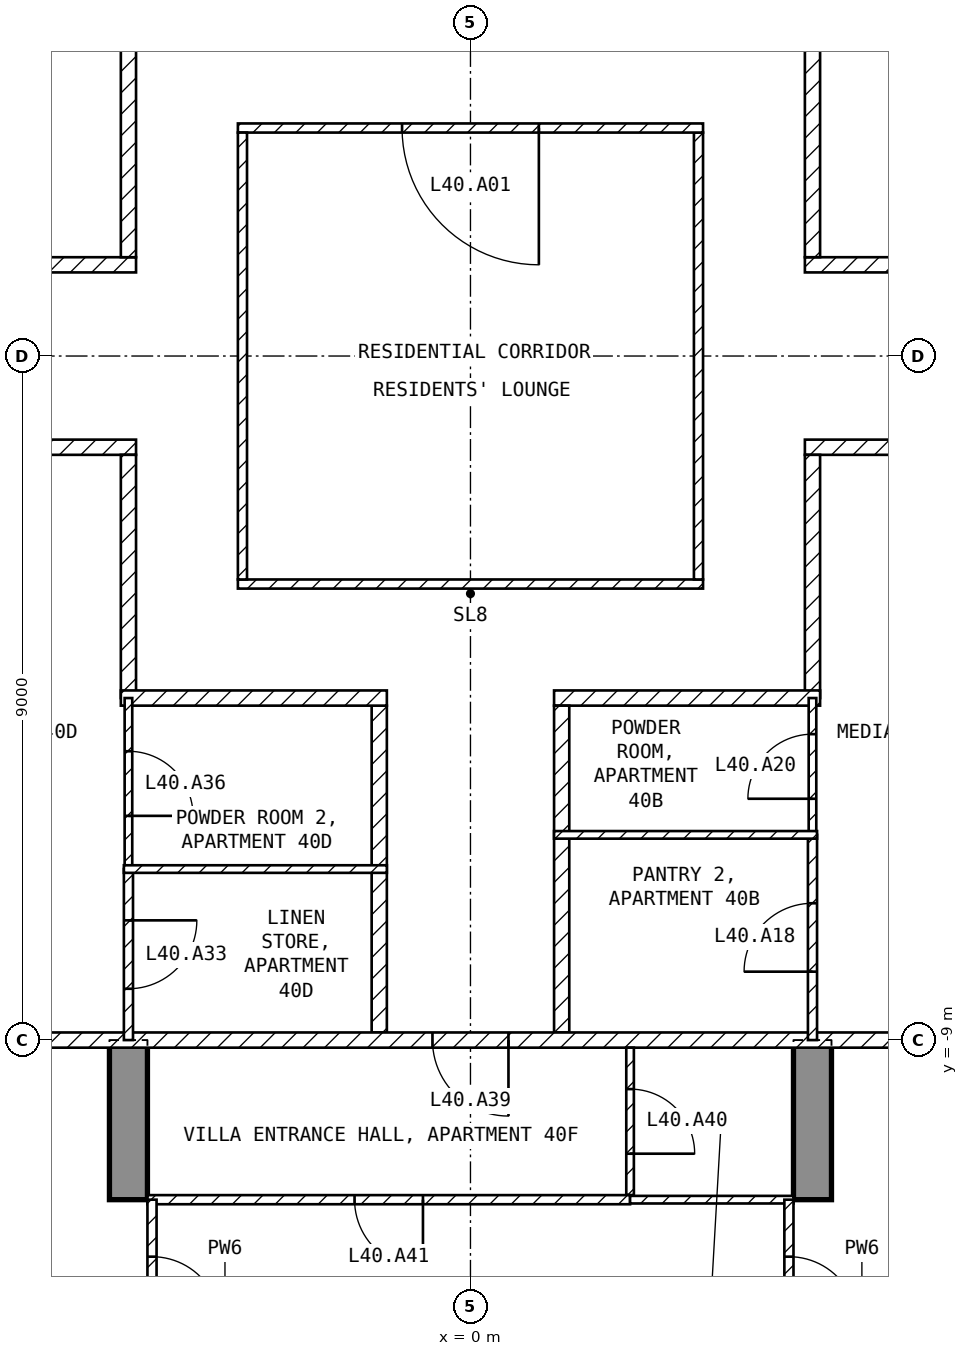
"""IFC4 building model, lengths in metres.
Left out: names, types, materials, properties, quantities, classifications, styles, units other than length and angle.
Written with IfcOpenShell. Run it as: python <this file> out.ifc"""

import sys

from ifc_helpers import new_model, si_unit, direction, frame, frame_2d, origin, place, context, subcontext, project, spatial, polyline, rectangle, outline, extrude, element, fill, save


model = new_model("IFC4")
c1 = context("Model", 3, precision=1e-05, world=origin(), true_north=direction((0.0, 1.0)))
c2 = subcontext(c1, "Body", "Model", "MODEL_VIEW")
j1 = project(units=[si_unit("LENGTHUNIT", "METRE"), si_unit("PLANEANGLEUNIT", "RADIAN")], contexts=[c1])
p1 = place(None, origin())
s1 = spatial("IfcSite", under=j1, at=p1, CompositionType="ELEMENT")
p2 = place(p1, origin())
s2 = spatial("IfcBuilding", under=s1, at=p2, CompositionType="ELEMENT")
p3 = place(p2, frame((0.0, 0.0, 166.6)))
s3 = spatial("IfcBuildingStorey", under=s2, at=p3, CompositionType="ELEMENT", Elevation=166.6)
for number, where, z_axis, x_axis in (
    (1, (-4.75, -20.225, -0.25), (1.0, 0.0, 0.0), (0.0, 1.0, 0.0)),
    (2, (4.25, -20.225, -0.25), (1.0, 0.0, 0.0), (0.0, 1.0, 0.0)),
):
    element("IfcWall", number, at=place(p3, frame(where, z_axis=z_axis, x_axis=x_axis)), inside=s3, PredefinedType="SHEAR", context=c2, shape_type="SweptSolid", body=[
        extrude(outline(polyline([(0.0, 0.0), (6.725, 0.0), (6.725, 2.65), (9.125, 2.65), (9.125, 0.0), (11.225, 0.0), (11.225, 3.5), (0.0, 3.5), (0.0, 0.0)])), origin(), (0.0, 0.0, 1.0), 0.5),
    ])
p4 = place(p3, frame((-3.06, -3.0, 0.0), z_axis=(0.0, 0.0, 1.0), x_axis=(1.0, 0.0, 0.0)))
e3 = element("IfcWall", 3, at=p4, inside=s3, PredefinedType="PARTITIONING", context=c2, shape_type="SweptSolid", body=[
    extrude(rectangle(XDim=6.12, YDim=0.12, at=frame_2d((3.06, 0.0))), origin(), (0.0, 0.0, 1.0), 3.25),
])
p5 = place(p3, frame((3.0, -2.94, 0.0), z_axis=(0.0, 0.0, 1.0), x_axis=(0.0, 1.0, 0.0)))
e4 = element("IfcWall", 4, at=p5, inside=s3, PredefinedType="PARTITIONING", context=c2, shape_type="SweptSolid", body=[
    extrude(rectangle(XDim=5.88, YDim=0.12, at=frame_2d((2.94, 0.0))), origin(), (0.0, 0.0, 1.0), 3.25),
])
p6 = place(p3, frame((3.06, 3.0, 0.0), z_axis=(0.0, 0.0, 1.0), x_axis=(-1.0, 0.0, 0.0)))
e5 = element("IfcWall", 5, at=p6, inside=s3, PredefinedType="PARTITIONING", context=c2, shape_type="SweptSolid", body=[
    extrude(rectangle(XDim=6.12, YDim=0.12, at=frame_2d((3.06, 0.0))), origin(), (0.0, 0.0, 1.0), 3.25),
])
p7 = place(p6, frame((2.16, 0.0, 0.0)))
e6 = element("IfcOpeningElement", 6, at=p7, cuts=e5, PredefinedType="OPENING", context=c2, shape_type="SweptSolid", body=[
    extrude(rectangle(XDim=1.8, YDim=2.1, at=frame_2d((0.9, 1.05))), frame((0.0, 0.07, 0.0), z_axis=(0.0, -1.0, 0.0), x_axis=(1.0, 0.0, 0.0)), (0.0, 0.0, 1.0), 0.14),
])
p8 = place(p3, frame((-3.0, 2.94, 0.0), z_axis=(0.0, 0.0, 1.0), x_axis=(0.0, -1.0, 0.0)))
e7 = element("IfcWall", 7, at=p8, inside=s3, PredefinedType="PARTITIONING", context=c2, shape_type="SweptSolid", body=[
    extrude(rectangle(XDim=5.88, YDim=0.12, at=frame_2d((2.94, 0.0))), origin(), (0.0, 0.0, 1.0), 3.25),
])
p9 = place(p3, frame((4.4, 1.2, 0.0), z_axis=(0.0, 0.0, 1.0), x_axis=(1.0, 0.0, 0.0)))
e8 = element("IfcWall", 8, at=p9, inside=s3, PredefinedType="PARTITIONING", context=c2, shape_type="SweptSolid", body=[
    extrude(rectangle(XDim=17.2, YDim=0.2, at=frame_2d((8.6, 0.0))), origin(), (0.0, 0.0, 1.0), 3.25),
])
p10 = place(p9, frame((10.475, 0.0, 0.0)))
e9 = element("IfcOpeningElement", 9, at=p10, cuts=e8, PredefinedType="OPENING", context=c2, shape_type="SweptSolid", body=[
    extrude(rectangle(XDim=1.0, YDim=2.1, at=frame_2d((0.5, 1.05))), frame((0.0, 0.11, 0.0), z_axis=(0.0, -1.0, 0.0), x_axis=(1.0, 0.0, 0.0)), (0.0, 0.0, 1.0), 0.22),
])
p11 = place(p3, frame((4.5, 4.5, 0.0), z_axis=(0.0, 0.0, 1.0), x_axis=(0.0, -1.0, 0.0)))
e10 = element("IfcWall", 10, at=p11, inside=s3, PredefinedType="PARTITIONING", context=c2, shape_type="SweptSolid", body=[
    extrude(rectangle(XDim=3.2, YDim=0.2, at=frame_2d((1.6, 0.0))), origin(), (0.0, 0.0, 1.0), 3.25),
])
p12 = place(p3, frame((21.6, -1.2, 0.0), z_axis=(0.0, 0.0, 1.0), x_axis=(-1.0, 0.0, 0.0)))
e11 = element("IfcWall", 11, at=p12, inside=s3, PredefinedType="PARTITIONING", context=c2, shape_type="SweptSolid", body=[
    extrude(rectangle(XDim=17.2, YDim=0.2, at=frame_2d((8.6, 0.0))), origin(), (0.0, 0.0, 1.0), 3.25),
])
p13 = place(p12, frame((3.625, 0.0, 0.0)))
e12 = element("IfcOpeningElement", 12, at=p13, cuts=e11, PredefinedType="OPENING", context=c2, shape_type="SweptSolid", body=[
    extrude(rectangle(XDim=1.0, YDim=2.1, at=frame_2d((0.5, 1.05))), frame((0.0, 0.11, 0.0), z_axis=(0.0, -1.0, 0.0), x_axis=(1.0, 0.0, 0.0)), (0.0, 0.0, 1.0), 0.22),
])
p14 = place(p3, frame((4.5, -1.3, 0.0), z_axis=(0.0, 0.0, 1.0), x_axis=(0.0, -1.0, 0.0)))
e13 = element("IfcWall", 13, at=p14, inside=s3, PredefinedType="PARTITIONING", context=c2, shape_type="SweptSolid", body=[
    extrude(rectangle(XDim=3.2, YDim=0.2, at=frame_2d((1.6, 0.0))), origin(), (0.0, 0.0, 1.0), 3.25),
])
p15 = place(p3, frame((4.6, -4.5, 0.0), z_axis=(0.0, 0.0, 1.0), x_axis=(-1.0, 0.0, 0.0)))
e14 = element("IfcWall", 14, at=p15, inside=s3, PredefinedType="PARTITIONING", context=c2, shape_type="SweptSolid", body=[
    extrude(rectangle(XDim=3.5, YDim=0.2, at=frame_2d((1.75, 0.0))), origin(), (0.0, 0.0, 1.0), 3.25),
])
p16 = place(p3, frame((1.2, -4.6, 0.0), z_axis=(0.0, 0.0, 1.0), x_axis=(0.0, -1.0, 0.0)))
e15 = element("IfcWall", 15, at=p16, inside=s3, PredefinedType="PARTITIONING", context=c2, shape_type="SweptSolid", body=[
    extrude(rectangle(XDim=4.3, YDim=0.2, at=frame_2d((2.15, 0.0))), origin(), (0.0, 0.0, 1.0), 3.25),
])
p17 = place(p3, frame((-21.6, 1.2, 0.0), z_axis=(0.0, 0.0, 1.0), x_axis=(1.0, 0.0, 0.0)))
e16 = element("IfcWall", 16, at=p17, inside=s3, PredefinedType="PARTITIONING", context=c2, shape_type="SweptSolid", body=[
    extrude(rectangle(XDim=17.2, YDim=0.2, at=frame_2d((8.6, 0.0))), origin(), (0.0, 0.0, 1.0), 3.25),
])
p18 = place(p17, frame((3.475, 0.0, 0.0)))
e17 = element("IfcOpeningElement", 17, at=p18, cuts=e16, PredefinedType="OPENING", context=c2, shape_type="SweptSolid", body=[
    extrude(rectangle(XDim=1.0, YDim=2.1, at=frame_2d((0.5, 1.05))), frame((0.0, 0.11, 0.0), z_axis=(0.0, -1.0, 0.0), x_axis=(1.0, 0.0, 0.0)), (0.0, 0.0, 1.0), 0.22),
])
p19 = place(p3, frame((-4.5, 1.3, 0.0), z_axis=(0.0, 0.0, 1.0), x_axis=(0.0, 1.0, 0.0)))
e18 = element("IfcWall", 18, at=p19, inside=s3, PredefinedType="PARTITIONING", context=c2, shape_type="SweptSolid", body=[
    extrude(rectangle(XDim=3.2, YDim=0.2, at=frame_2d((1.6, 0.0))), origin(), (0.0, 0.0, 1.0), 3.25),
])
p20 = place(p3, frame((-4.4, -1.2, 0.0), z_axis=(0.0, 0.0, 1.0), x_axis=(-1.0, 0.0, 0.0)))
e19 = element("IfcWall", 19, at=p20, inside=s3, PredefinedType="PARTITIONING", context=c2, shape_type="SweptSolid", body=[
    extrude(rectangle(XDim=17.2, YDim=0.2, at=frame_2d((8.6, 0.0))), origin(), (0.0, 0.0, 1.0), 3.25),
])
p21 = place(p20, frame((9.95, 0.0, 0.0)))
e20 = element("IfcOpeningElement", 20, at=p21, cuts=e19, PredefinedType="OPENING", context=c2, shape_type="SweptSolid", body=[
    extrude(rectangle(XDim=1.0, YDim=2.1, at=frame_2d((0.5, 1.05))), frame((0.0, 0.11, 0.0), z_axis=(0.0, -1.0, 0.0), x_axis=(1.0, 0.0, 0.0)), (0.0, 0.0, 1.0), 0.22),
])
p22 = place(p3, frame((-4.5, -4.5, 0.0), z_axis=(0.0, 0.0, 1.0), x_axis=(0.0, 1.0, 0.0)))
e21 = element("IfcWall", 21, at=p22, inside=s3, PredefinedType="PARTITIONING", context=c2, shape_type="SweptSolid", body=[
    extrude(rectangle(XDim=3.2, YDim=0.2, at=frame_2d((1.6, 0.0))), origin(), (0.0, 0.0, 1.0), 3.25),
])
p23 = place(p3, frame((-1.2, -8.9, 0.0), z_axis=(0.0, 0.0, 1.0), x_axis=(0.0, 1.0, 0.0)))
e22 = element("IfcWall", 22, at=p23, inside=s3, PredefinedType="PARTITIONING", context=c2, shape_type="SweptSolid", body=[
    extrude(rectangle(XDim=4.3, YDim=0.2, at=frame_2d((2.15, 0.0))), origin(), (0.0, 0.0, 1.0), 3.25),
])
p24 = place(p3, frame((-1.1, -4.5, 0.0), z_axis=(0.0, 0.0, 1.0), x_axis=(-1.0, 0.0, 0.0)))
e23 = element("IfcWall", 23, at=p24, inside=s3, PredefinedType="PARTITIONING", context=c2, shape_type="SweptSolid", body=[
    extrude(rectangle(XDim=3.5, YDim=0.2, at=frame_2d((1.75, 0.0))), origin(), (0.0, 0.0, 1.0), 3.25),
])
p25 = place(p3, frame((8.92, -9.0, 0.0), z_axis=(0.0, 0.0, 1.0), x_axis=(-1.0, 0.0, 0.0)))
e24 = element("IfcWall", 24, at=p25, inside=s3, PredefinedType="PARTITIONING", context=c2, shape_type="SweptSolid", body=[
    extrude(rectangle(XDim=17.84, YDim=0.2, at=frame_2d((8.92, 0.0))), origin(), (0.0, 0.0, 1.0), 3.25),
])
p26 = place(p25, frame((8.42, 0.0, 0.0)))
e25 = element("IfcOpeningElement", 25, at=p26, cuts=e24, PredefinedType="OPENING", context=c2, shape_type="SweptSolid", body=[
    extrude(rectangle(XDim=1.0, YDim=2.1, at=frame_2d((0.5, 1.05))), frame((0.0, 0.11, 0.0), z_axis=(0.0, -1.0, 0.0), x_axis=(1.0, 0.0, 0.0)), (0.0, 0.0, 1.0), 0.22),
])
p27 = place(p3, frame((4.5, -6.3, 0.0), z_axis=(0.0, 0.0, 1.0), x_axis=(0.0, 1.0, 0.0)))
e26 = element("IfcWall", 26, at=p27, inside=s3, PredefinedType="PARTITIONING", context=c2, shape_type="SweptSolid", body=[
    extrude(rectangle(XDim=1.8, YDim=0.1, at=frame_2d((0.9, 0.0))), origin(), (0.0, 0.0, 1.0), 3.25),
])
p28 = place(p27, frame((0.475, 0.0, 0.0)))
e27 = element("IfcOpeningElement", 27, at=p28, cuts=e26, PredefinedType="OPENING", context=c2, shape_type="SweptSolid", body=[
    extrude(rectangle(XDim=0.85, YDim=2.1, at=frame_2d((0.425, 1.05))), frame((0.0, 0.06, 0.0), z_axis=(0.0, -1.0, 0.0), x_axis=(1.0, 0.0, 0.0)), (0.0, 0.0, 1.0), 0.12),
])
p29 = place(p3, frame((4.5, -9.0, 0.0), z_axis=(0.0, 0.0, 1.0), x_axis=(0.0, 1.0, 0.0)))
e28 = element("IfcWall", 28, at=p29, inside=s3, PredefinedType="PARTITIONING", context=c2, shape_type="SweptSolid", body=[
    extrude(rectangle(XDim=2.7, YDim=0.12, at=frame_2d((1.35, 0.0))), origin(), (0.0, 0.0, 1.0), 3.25),
])
p30 = place(p29, frame((0.9, 0.0, 0.0)))
e29 = element("IfcOpeningElement", 29, at=p30, cuts=e28, PredefinedType="OPENING", context=c2, shape_type="SweptSolid", body=[
    extrude(rectangle(XDim=0.9, YDim=2.1, at=frame_2d((0.45, 1.05))), frame((0.0, 0.07, 0.0), z_axis=(0.0, -1.0, 0.0), x_axis=(1.0, 0.0, 0.0)), (0.0, 0.0, 1.0), 0.14),
])
p31 = place(p3, frame((4.56, -6.3, 0.0), z_axis=(0.0, 0.0, 1.0), x_axis=(-1.0, 0.0, 0.0)))
e30 = element("IfcWall", 30, at=p31, inside=s3, PredefinedType="PARTITIONING", context=c2, shape_type="SweptSolid", body=[
    extrude(rectangle(XDim=3.46, YDim=0.1, at=frame_2d((1.73, 0.0))), origin(), (0.0, 0.0, 1.0), 3.25),
])
p32 = place(p3, frame((-4.5, -4.5, 0.0), z_axis=(0.0, 0.0, 1.0), x_axis=(0.0, -1.0, 0.0)))
e31 = element("IfcWall", 31, at=p32, inside=s3, PredefinedType="PARTITIONING", context=c2, shape_type="SweptSolid", body=[
    extrude(rectangle(XDim=2.25, YDim=0.1, at=frame_2d((1.125, 0.0))), origin(), (0.0, 0.0, 1.0), 3.25),
])
p33 = place(p32, frame((0.7, 0.0, 0.0)))
e32 = element("IfcOpeningElement", 32, at=p33, cuts=e31, PredefinedType="OPENING", context=c2, shape_type="SweptSolid", body=[
    extrude(rectangle(XDim=0.85, YDim=2.1, at=frame_2d((0.425, 1.05))), frame((0.0, 0.06, 0.0), z_axis=(0.0, -1.0, 0.0), x_axis=(1.0, 0.0, 0.0)), (0.0, 0.0, 1.0), 0.12),
])
p34 = place(p3, frame((-4.5, -6.75, 0.0), z_axis=(0.0, 0.0, 1.0), x_axis=(0.0, -1.0, 0.0)))
e33 = element("IfcWall", 33, at=p34, inside=s3, PredefinedType="PARTITIONING", context=c2, shape_type="SweptSolid", body=[
    extrude(rectangle(XDim=2.25, YDim=0.12, at=frame_2d((1.125, 0.0))), origin(), (0.0, 0.0, 1.0), 3.25),
])
p35 = place(p34, frame((0.675, 0.0, 0.0)))
e34 = element("IfcOpeningElement", 34, at=p35, cuts=e33, PredefinedType="OPENING", context=c2, shape_type="SweptSolid", body=[
    extrude(rectangle(XDim=0.9, YDim=2.1, at=frame_2d((0.45, 1.05))), frame((0.0, 0.07, 0.0), z_axis=(0.0, -1.0, 0.0), x_axis=(1.0, 0.0, 0.0)), (0.0, 0.0, 1.0), 0.14),
])
p36 = place(p3, frame((-1.1, -6.75, 0.0), z_axis=(0.0, 0.0, 1.0), x_axis=(-1.0, 0.0, 0.0)))
e35 = element("IfcWall", 35, at=p36, inside=s3, PredefinedType="PARTITIONING", context=c2, shape_type="SweptSolid", body=[
    extrude(rectangle(XDim=3.46, YDim=0.1, at=frame_2d((1.73, 0.0))), origin(), (0.0, 0.0, 1.0), 3.25),
])
p37 = place(p3, frame((2.1, -9.1, 0.0), z_axis=(0.0, 0.0, 1.0), x_axis=(0.0, -1.0, 0.0)))
e36 = element("IfcWall", 36, at=p37, inside=s3, PredefinedType="PARTITIONING", context=c2, shape_type="SweptSolid", body=[
    extrude(rectangle(XDim=1.94, YDim=0.1, at=frame_2d((0.97, 0.0))), origin(), (0.0, 0.0, 1.0), 3.25),
])
p38 = place(p37, frame((0.545, 0.0, 0.0)))
e37 = element("IfcOpeningElement", 37, at=p38, cuts=e36, PredefinedType="OPENING", context=c2, shape_type="SweptSolid", body=[
    extrude(rectangle(XDim=0.85, YDim=2.1, at=frame_2d((0.425, 1.05))), frame((0.0, 0.06, 0.0), z_axis=(0.0, -1.0, 0.0), x_axis=(1.0, 0.0, 0.0)), (0.0, 0.0, 1.0), 0.12),
])
p39 = place(p3, frame((2.1, -11.1, 0.0), z_axis=(0.0, 0.0, 1.0), x_axis=(-1.0, 0.0, 0.0)))
e38 = element("IfcWall", 38, at=p39, inside=s3, PredefinedType="PARTITIONING", context=c2, shape_type="SweptSolid", body=[
    extrude(rectangle(XDim=6.35, YDim=0.12, at=frame_2d((3.175, 0.0))), origin(), (0.0, 0.0, 1.0), 3.25),
])
p40 = place(p39, frame((2.725, 0.0, 0.0)))
e39 = element("IfcOpeningElement", 39, at=p40, cuts=e38, PredefinedType="OPENING", context=c2, shape_type="SweptSolid", body=[
    extrude(rectangle(XDim=0.9, YDim=2.1, at=frame_2d((0.45, 1.05))), frame((0.0, 0.07, 0.0), z_axis=(0.0, -1.0, 0.0), x_axis=(1.0, 0.0, 0.0)), (0.0, 0.0, 1.0), 0.14),
])
p41 = place(p3, frame((4.25, -11.1, 0.0), z_axis=(0.0, 0.0, 1.0), x_axis=(-1.0, 0.0, 0.0)))
e40 = element("IfcWall", 40, at=p41, inside=s3, PredefinedType="PARTITIONING", context=c2, shape_type="SweptSolid", body=[
    extrude(rectangle(XDim=2.15, YDim=0.1, at=frame_2d((1.075, 0.0))), origin(), (0.0, 0.0, 1.0), 3.25),
])
p42 = place(p3, frame((4.19, -11.1, 0.0), z_axis=(0.0, 0.0, 1.0), x_axis=(0.0, -1.0, 0.0)))
e41 = element("IfcWall", 41, at=p42, inside=s3, PredefinedType="PARTITIONING", context=c2, shape_type="SweptSolid", body=[
    extrude(rectangle(XDim=2.4, YDim=0.12, at=frame_2d((1.2, 0.0))), origin(), (0.0, 0.0, 1.0), 2.4),
])
p43 = place(p42, frame((0.75, 0.0, 0.0)))
e42 = element("IfcOpeningElement", 42, at=p43, cuts=e41, PredefinedType="OPENING", context=c2, shape_type="SweptSolid", body=[
    extrude(rectangle(XDim=0.9, YDim=2.1, at=frame_2d((0.45, 1.05))), frame((0.0, 0.07, 0.0), z_axis=(0.0, -1.0, 0.0), x_axis=(1.0, 0.0, 0.0)), (0.0, 0.0, 1.0), 0.14),
])
p44 = place(p3, frame((-4.19, -11.1, 0.0), z_axis=(0.0, 0.0, 1.0), x_axis=(0.0, -1.0, 0.0)))
e43 = element("IfcWall", 43, at=p44, inside=s3, PredefinedType="PARTITIONING", context=c2, shape_type="SweptSolid", body=[
    extrude(rectangle(XDim=2.4, YDim=0.12, at=frame_2d((1.2, 0.0))), origin(), (0.0, 0.0, 1.0), 2.4),
])
p45 = place(p44, frame((0.75, 0.0, 0.0)))
e44 = element("IfcOpeningElement", 44, at=p45, cuts=e43, PredefinedType="OPENING", context=c2, shape_type="SweptSolid", body=[
    extrude(rectangle(XDim=0.9, YDim=2.1, at=frame_2d((0.45, 1.05))), frame((0.0, 0.07, 0.0), z_axis=(0.0, -1.0, 0.0), x_axis=(1.0, 0.0, 0.0)), (0.0, 0.0, 1.0), 0.14),
])
p46 = place(p7, origin())
e45 = element("IfcDoor", 45, at=p46, inside=s3, OperationType="SINGLE_SWING_LEFT", PredefinedType="DOOR", context=c2, shape_type="SweptSolid", body=[
    extrude(rectangle(XDim=1.8, YDim=2.1, at=frame_2d((0.9, 1.05))), frame((0.0, 0.025, 0.0), z_axis=(0.0, -1.0, 0.0), x_axis=(1.0, 0.0, 0.0)), (0.0, 0.0, 1.0), 0.05),
])
fill(e6, e45)
p47 = place(p30, origin())
e46 = element("IfcDoor", 46, at=p47, inside=s3, OperationType="SINGLE_SWING_LEFT", PredefinedType="DOOR", context=c2, shape_type="SweptSolid", body=[
    extrude(rectangle(XDim=0.9, YDim=2.1, at=frame_2d((0.45, 1.05))), frame((0.0, 0.025, 0.0), z_axis=(0.0, -1.0, 0.0), x_axis=(1.0, 0.0, 0.0)), (0.0, 0.0, 1.0), 0.05),
])
fill(e29, e46)
p48 = place(p28, origin())
e47 = element("IfcDoor", 47, at=p48, inside=s3, OperationType="SINGLE_SWING_LEFT", PredefinedType="DOOR", context=c2, shape_type="SweptSolid", body=[
    extrude(rectangle(XDim=0.85, YDim=2.1, at=frame_2d((0.425, 1.05))), frame((0.0, 0.025, 0.0), z_axis=(0.0, -1.0, 0.0), x_axis=(1.0, 0.0, 0.0)), (0.0, 0.0, 1.0), 0.05),
])
fill(e27, e47)
p49 = place(p35, origin())
e48 = element("IfcDoor", 48, at=p49, inside=s3, OperationType="SINGLE_SWING_LEFT", PredefinedType="DOOR", context=c2, shape_type="SweptSolid", body=[
    extrude(rectangle(XDim=0.9, YDim=2.1, at=frame_2d((0.45, 1.05))), frame((0.0, 0.025, 0.0), z_axis=(0.0, -1.0, 0.0), x_axis=(1.0, 0.0, 0.0)), (0.0, 0.0, 1.0), 0.05),
])
fill(e34, e48)
p50 = place(p33, origin())
e49 = element("IfcDoor", 49, at=p50, inside=s3, OperationType="SINGLE_SWING_RIGHT", PredefinedType="DOOR", context=c2, shape_type="SweptSolid", body=[
    extrude(rectangle(XDim=0.85, YDim=2.1, at=frame_2d((0.425, 1.05))), frame((0.0, 0.025, 0.0), z_axis=(0.0, -1.0, 0.0), x_axis=(1.0, 0.0, 0.0)), (0.0, 0.0, 1.0), 0.05),
])
fill(e32, e49)
p51 = place(p26, origin())
e50 = element("IfcDoor", 50, at=p51, inside=s3, OperationType="SINGLE_SWING_LEFT", PredefinedType="DOOR", context=c2, shape_type="SweptSolid", body=[
    extrude(rectangle(XDim=1.0, YDim=2.1, at=frame_2d((0.5, 1.05))), frame((0.0, 0.025, 0.0), z_axis=(0.0, -1.0, 0.0), x_axis=(1.0, 0.0, 0.0)), (0.0, 0.0, 1.0), 0.05),
])
fill(e25, e50)
p52 = place(p38, origin())
e51 = element("IfcDoor", 51, at=p52, inside=s3, OperationType="SINGLE_SWING_RIGHT", PredefinedType="DOOR", context=c2, shape_type="SweptSolid", body=[
    extrude(rectangle(XDim=0.85, YDim=2.1, at=frame_2d((0.425, 1.05))), frame((0.0, 0.025, 0.0), z_axis=(0.0, -1.0, 0.0), x_axis=(1.0, 0.0, 0.0)), (0.0, 0.0, 1.0), 0.05),
])
fill(e37, e51)
p53 = place(p40, origin())
e52 = element("IfcDoor", 52, at=p53, inside=s3, OperationType="SINGLE_SWING_LEFT", PredefinedType="DOOR", context=c2, shape_type="SweptSolid", body=[
    extrude(rectangle(XDim=0.9, YDim=2.1, at=frame_2d((0.45, 1.05))), frame((0.0, 0.025, 0.0), z_axis=(0.0, -1.0, 0.0), x_axis=(1.0, 0.0, 0.0)), (0.0, 0.0, 1.0), 0.05),
])
fill(e39, e52)
p54 = place(p43, origin())
e53 = element("IfcDoor", 53, at=p54, inside=s3, OperationType="SINGLE_SWING_RIGHT", PredefinedType="DOOR", context=c2, shape_type="SweptSolid", body=[
    extrude(rectangle(XDim=0.9, YDim=2.1, at=frame_2d((0.45, 1.05))), frame((0.0, 0.025, 0.0), z_axis=(0.0, -1.0, 0.0), x_axis=(1.0, 0.0, 0.0)), (0.0, 0.0, 1.0), 0.05),
])
fill(e42, e53)
p55 = place(p45, origin())
e54 = element("IfcDoor", 54, at=p55, inside=s3, OperationType="SINGLE_SWING_RIGHT", PredefinedType="DOOR", context=c2, shape_type="SweptSolid", body=[
    extrude(rectangle(XDim=0.9, YDim=2.1, at=frame_2d((0.45, 1.05))), frame((0.0, 0.025, 0.0), z_axis=(0.0, -1.0, 0.0), x_axis=(1.0, 0.0, 0.0)), (0.0, 0.0, 1.0), 0.05),
])
fill(e44, e54)
save(model, sys.argv[1])
